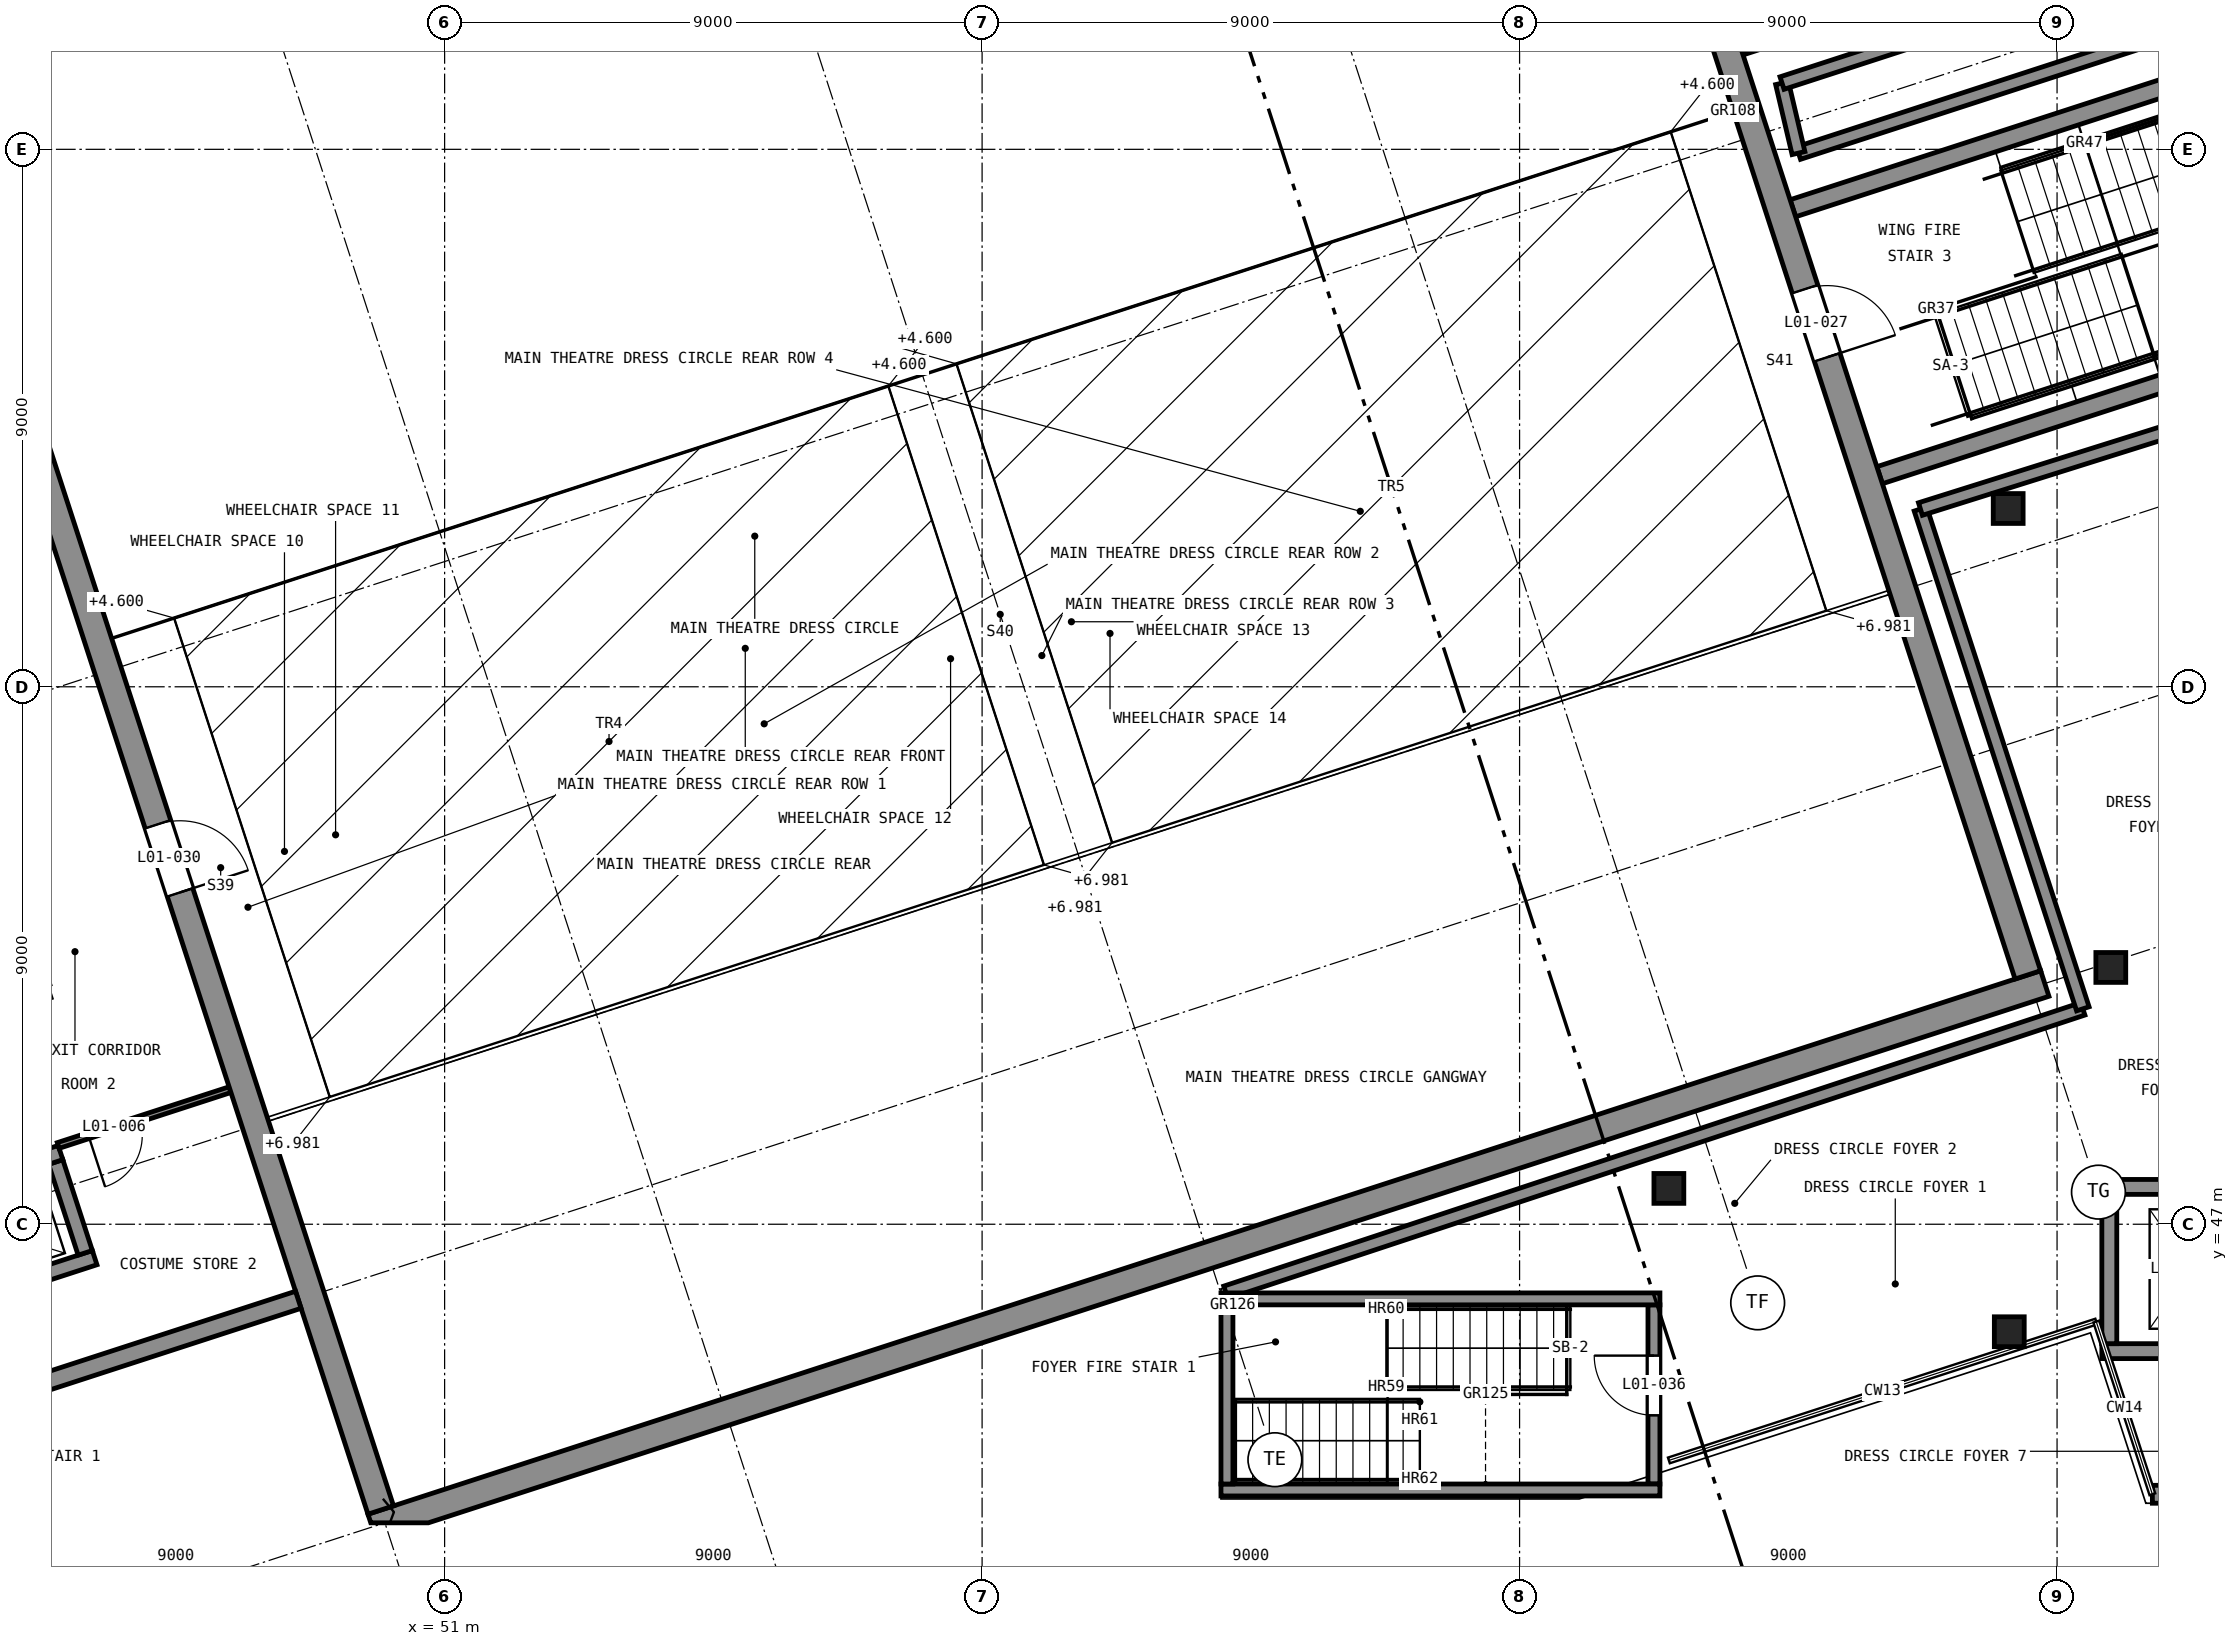
"""IFC4 building model, lengths in metres.
Left out: names, types, materials, properties, quantities, classifications, styles, units other than length and angle.
Written with IfcOpenShell. Run it as: python <this file> out.ifc"""

import sys

from ifc_helpers import new_model, si_unit, direction, frame, frame_2d, origin, origin_2d, place, context, subcontext, project, spatial, rectangle, extrude, element, fill, save


model = new_model("IFC4")
c1 = context("Model", 3, precision=1e-05, world=origin(), true_north=direction((0.0, 1.0)))
c2 = subcontext(c1, "Body", "Model", "MODEL_VIEW")
j1 = project(units=[si_unit("LENGTHUNIT", "METRE"), si_unit("PLANEANGLEUNIT", "RADIAN")], contexts=[c1])
p1 = place(None, origin())
s1 = spatial("IfcSite", under=j1, at=p1, CompositionType="ELEMENT")
p2 = place(p1, origin())
s2 = spatial("IfcBuilding", under=s1, at=p2, CompositionType="ELEMENT")
p3 = place(p2, frame((0.0, 0.0, 5.5)))
s3 = spatial("IfcBuildingStorey", under=s2, at=p3, CompositionType="ELEMENT", Elevation=5.5)
p4 = place(p3, frame((49.786, 41.93, 0.0), z_axis=(0.0, 0.0, 1.0), x_axis=(0.951055937194, 0.309018776661, 0.0)))
e1 = element("IfcWall", 1, at=p4, inside=s3, PredefinedType="SHEAR", context=c2, shape_type="SweptSolid", body=[
    extrude(rectangle(XDim=29.45, YDim=0.45, at=frame_2d((14.725, 0.0))), origin(), (0.0, 0.0, 1.0), 4.0),
])
p5 = place(p3, frame((49.93, 42.214, 0.0), z_axis=(0.0, 0.0, 1.0), x_axis=(-0.309016215614, 0.95105676933, 0.0)))
e2 = element("IfcWall", 2, at=p5, inside=s3, PredefinedType="SHEAR", context=c2, shape_type="SweptSolid", body=[
    extrude(rectangle(XDim=27.975, YDim=0.45, at=frame_2d((13.988, 0.0))), origin(), (0.0, 0.0, 1.0), 4.0),
])
p6 = place(p5, frame((10.875, 0.0, 0.0)))
e3 = element("IfcOpeningElement", 3, at=p6, cuts=e2, PredefinedType="OPENING", context=c2, shape_type="SweptSolid", body=[
    extrude(rectangle(XDim=1.2, YDim=2.1, at=frame_2d((0.6, 1.05))), frame((0.0, 0.235, 0.0), z_axis=(0.0, -1.0, 0.0), x_axis=(1.0, 0.0, 0.0)), (0.0, 0.0, 1.0), 0.47),
])
p7 = place(p3, frame((77.511, 51.176, 0.0), z_axis=(0.0, 0.0, 1.0), x_axis=(-0.309018780445, 0.951055935964, 0.0)))
e4 = element("IfcWall", 4, at=p7, inside=s3, PredefinedType="SHEAR", context=c2, shape_type="SweptSolid", body=[
    extrude(rectangle(XDim=27.975, YDim=0.45, at=frame_2d((13.987, 0.0))), origin(), (0.0, 0.0, 1.0), 4.0),
])
p8 = place(p7, frame((10.875, 0.0, 0.0)))
e5 = element("IfcOpeningElement", 5, at=p8, cuts=e4, PredefinedType="OPENING", context=c2, shape_type="SweptSolid", body=[
    extrude(rectangle(XDim=1.2, YDim=2.1, at=frame_2d((0.6, 1.05))), frame((0.0, 0.235, 0.0), z_axis=(0.0, -1.0, 0.0), x_axis=(1.0, 0.0, 0.0)), (0.0, 0.0, 1.0), 0.47),
])
p9 = place(p3, frame((48.55, 45.735, 0.0), z_axis=(0.0, 0.0, 1.0), x_axis=(-0.951061216338, -0.309002528757, 0.0)))
e6 = element("IfcWall", 6, at=p9, inside=s3, PredefinedType="SOLIDWALL", context=c2, shape_type="SweptSolid", body=[
    extrude(rectangle(XDim=15.925, YDim=0.3, at=frame_2d((7.962, 0.0))), origin(), (0.0, 0.0, 1.0), 4.0),
])
p10 = place(p3, frame((75.029, 59.543, 0.0), z_axis=(0.0, 0.0, 1.0), x_axis=(0.951057649576, 0.309013506475, 0.0)))
e7 = element("IfcWall", 7, at=p10, inside=s3, PredefinedType="SOLIDWALL", context=c2, shape_type="SweptSolid", body=[
    extrude(rectangle(XDim=7.075, YDim=0.3, at=frame_2d((3.538, 0.0))), origin(), (0.0, 0.0, 1.0), 3.7),
])
p11 = place(p3, frame((80.305, 66.199, 0.0), z_axis=(0.0, 0.0, 1.0), x_axis=(-0.951054354327, -0.309023648149, 0.0)))
e8 = element("IfcWall", 8, at=p11, inside=s3, PredefinedType="SOLIDWALL", context=c2, shape_type="SweptSolid", body=[
    extrude(rectangle(XDim=7.075, YDim=0.3, at=frame_2d((3.537, 0.0))), origin(), (0.0, 0.0, 1.0), 3.7),
])
p12 = place(p3, frame((42.382, 45.544, 0.0), z_axis=(0.0, 0.0, 1.0), x_axis=(0.951071801089, 0.308969948659, 0.0)))
e9 = element("IfcWall", 9, at=p12, inside=s3, PredefinedType="SHEAR", context=c2, shape_type="SweptSolid", body=[
    extrude(rectangle(XDim=2.9, YDim=0.25, at=frame_2d((1.45, 0.0))), origin(), (0.0, 0.0, 1.0), 4.0),
])
p13 = place(p3, frame((44.982, 46.521, 0.0), z_axis=(0.0, 0.0, 1.0), x_axis=(-0.308986014439, 0.951066581729, 0.0)))
e10 = element("IfcWall", 10, at=p13, inside=s3, PredefinedType="SHEAR", context=c2, shape_type="SweptSolid", body=[
    extrude(rectangle(XDim=1.6, YDim=0.25, at=frame_2d((0.8, 0.0))), origin(), (0.0, 0.0, 1.0), 4.0),
])
p14 = place(p3, frame((44.568, 48.2, 0.0), z_axis=(0.0, 0.0, 1.0), x_axis=(-0.951047059821, -0.309046096893, 0.0)))
e11 = element("IfcWall", 11, at=p14, inside=s3, PredefinedType="SHEAR", context=c2, shape_type="SweptSolid", body=[
    extrude(rectangle(XDim=2.9, YDim=0.25, at=frame_2d((1.45, 0.0))), origin(), (0.0, 0.0, 1.0), 4.0),
])
p15 = place(p14, frame((0.9, 0.0, 0.0)))
e12 = element("IfcOpeningElement", 12, at=p15, cuts=e11, PredefinedType="OPENING", context=c2, shape_type="SweptSolid", body=[
    extrude(rectangle(XDim=1.1, YDim=2.1, at=frame_2d((0.55, 1.05))), frame((0.0, 0.135, 0.0), z_axis=(0.0, -1.0, 0.0), x_axis=(1.0, 0.0, 0.0)), (0.0, 0.0, 1.0), 0.27),
])
p16 = place(p3, frame((72.727, 66.708, 0.0), z_axis=(0.0, 0.0, 1.0), x_axis=(0.951087187149, 0.308922583248, 0.0)))
e13 = element("IfcWall", 13, at=p16, inside=s3, PredefinedType="SHEAR", context=c2, shape_type="SweptSolid", body=[
    extrude(rectangle(XDim=2.6, YDim=0.25, at=frame_2d((1.3, 0.0))), origin(), (0.0, 0.0, 1.0), 4.0),
])
for number, where, z_axis, x_axis in (
    (14, (64.0, 42.55, 0.0), (0.0, 0.0, 1.0), (1.0, 0.0, 0.0)),
    (15, (71.35, 45.75, 0.0), (0.0, 0.0, 1.0), (-1.0, 0.0, 0.0)),
):
    element("IfcWall", number, at=place(p3, frame(where, z_axis=z_axis, x_axis=x_axis)), inside=s3, PredefinedType="SHEAR", context=c2, shape_type="SweptSolid", body=[
        extrude(rectangle(XDim=7.35, YDim=0.2, at=frame_2d((3.675, 0.0))), origin(), (0.0, 0.0, 1.0), 4.0),
    ])
p17 = place(p3, frame((64.1, 45.65, 0.0), z_axis=(0.0, 0.0, 1.0), x_axis=(0.0, -1.0, 0.0)))
e16 = element("IfcWall", 16, at=p17, inside=s3, PredefinedType="SHEAR", context=c2, shape_type="SweptSolid", body=[
    extrude(rectangle(XDim=3.0, YDim=0.2, at=frame_2d((1.5, 0.0))), origin(), (0.0, 0.0, 1.0), 4.0),
])
p18 = place(p3, frame((71.25, 42.65, 0.0), z_axis=(0.0, 0.0, 1.0), x_axis=(0.0, 1.0, 0.0)))
e17 = element("IfcWall", 17, at=p18, inside=s3, PredefinedType="SHEAR", context=c2, shape_type="SweptSolid", body=[
    extrude(rectangle(XDim=3.0, YDim=0.2, at=frame_2d((1.5, 0.0))), origin(), (0.0, 0.0, 1.0), 4.0),
])
p19 = place(p18, frame((1.15, 0.0, 0.0)))
e18 = element("IfcOpeningElement", 18, at=p19, cuts=e17, PredefinedType="OPENING", context=c2, shape_type="SweptSolid", body=[
    extrude(rectangle(XDim=1.0, YDim=2.1, at=frame_2d((0.5, 1.05))), frame((0.0, 0.11, 0.0), z_axis=(0.0, -1.0, 0.0), x_axis=(1.0, 0.0, 0.0)), (0.0, 0.0, 1.0), 0.22),
])
for number, where, z_axis, x_axis in (
    (19, (78.75, 44.875, 0.0), (0.0, 0.0, 1.0), (1.0, 0.0, 0.0)),
    (20, (81.75, 47.625, 0.0), (0.0, 0.0, 1.0), (-1.0, 0.0, 0.0)),
):
    element("IfcWall", number, at=place(p3, frame(where, z_axis=z_axis, x_axis=x_axis)), inside=s3, PredefinedType="SHEAR", context=c2, shape_type="SweptSolid", body=[
        extrude(rectangle(XDim=3.0, YDim=0.25, at=frame_2d((1.5, 0.0))), origin(), (0.0, 0.0, 1.0), 4.0),
    ])
p20 = place(p3, frame((78.875, 47.5, 0.0), z_axis=(0.0, 0.0, 1.0), x_axis=(0.0, -1.0, 0.0)))
e21 = element("IfcWall", 21, at=p20, inside=s3, PredefinedType="SHEAR", context=c2, shape_type="SweptSolid", body=[
    extrude(rectangle(XDim=2.5, YDim=0.25, at=frame_2d((1.25, 0.0))), origin(), (0.0, 0.0, 1.0), 4.0),
])
for number, where, z_axis, x_axis in (
    (22, (77.2, 45.2, 0.0), (0.0, 0.0, 1.0), (1.0, 0.0, 0.0)),
    (23, (71.5, 47.6, 0.0), (0.0, 0.0, 1.0), (1.0, 0.0, 0.0)),
    (24, (78.9, 51.3, 0.0), (0.0, 0.0, 1.0), (1.0, 0.0, 0.0)),
    (25, (77.182, 58.985, 0.0), (0.0, 0.0, 1.0), (1.0, 0.0, 0.0)),
):
    element("IfcColumn", number, at=place(p3, frame(where, z_axis=z_axis, x_axis=x_axis)), inside=s3, PredefinedType="COLUMN", context=c2, shape_type="SweptSolid", body=[
        extrude(rectangle(XDim=0.5, YDim=0.5, at=origin_2d()), origin(), (0.0, 0.0, 1.0), 4.0),
    ])
p21 = place(p3, frame((79.596, 42.478, 0.0), z_axis=(0.0, 0.0, 1.0), x_axis=(1.0, 0.0, 0.0)))
e26 = element("IfcWall", 26, at=p21, inside=s3, PredefinedType="SOLIDWALL", context=c2, shape_type="SweptSolid", body=[
    extrude(rectangle(XDim=2.941, YDim=0.3, at=frame_2d((1.471, 0.0))), origin(), (0.0, 0.0, 1.0), 3.7),
])
p22 = place(p3, frame((64.081, 45.859, 0.0), z_axis=(0.0, 0.0, 1.0), x_axis=(0.949388338269, 0.314104732786, 0.0)))
e27 = element("IfcWall", 27, at=p22, inside=s3, PredefinedType="SOLIDWALL", context=c2, shape_type="SweptSolid", body=[
    extrude(rectangle(XDim=15.116, YDim=0.22, at=frame_2d((7.558, 0.0))), origin(), (0.0, 0.0, 1.0), 3.7),
])
p23 = place(p3, frame((78.432, 50.607, 0.0), z_axis=(0.0, 0.0, 1.0), x_axis=(-0.309027731765, 0.951053027439, 0.0)))
e28 = element("IfcWall", 28, at=p23, inside=s3, PredefinedType="SOLIDWALL", context=c2, shape_type="SweptSolid", body=[
    extrude(rectangle(XDim=8.8, YDim=0.22, at=frame_2d((4.4, 0.0))), origin(), (0.0, 0.0, 1.0), 3.7),
])
p24 = place(p3, frame((75.712, 58.977, 0.0), z_axis=(0.0, 0.0, 1.0), x_axis=(0.954020604523, 0.299741031802, 0.0)))
e29 = element("IfcWall", 29, at=p24, inside=s3, PredefinedType="SOLIDWALL", context=c2, shape_type="SweptSolid", body=[
    extrude(rectangle(XDim=7.271, YDim=0.22, at=frame_2d((3.635, 0.0))), origin(), (0.0, 0.0, 1.0), 3.7),
])
p25 = place(p3, frame((80.613, 67.193, 0.0), z_axis=(0.0, 0.0, 1.0), x_axis=(-0.951057168147, -0.309014988174, 0.0)))
e30 = element("IfcWall", 30, at=p25, inside=s3, PredefinedType="SOLIDWALL", context=c2, shape_type="SweptSolid", body=[
    extrude(rectangle(XDim=7.3, YDim=0.22, at=frame_2d((3.65, 0.0))), origin(), (0.0, 0.0, 1.0), 3.7),
])
p26 = place(p3, frame((73.67, 64.937, 0.0), z_axis=(0.0, 0.0, 1.0), x_axis=(-0.228915017266, 0.973446410888, 0.0)))
e31 = element("IfcWall", 31, at=p26, inside=s3, PredefinedType="SOLIDWALL", context=c2, shape_type="SweptSolid", body=[
    extrude(rectangle(XDim=1.204, YDim=0.22, at=frame_2d((0.602, 0.0))), origin(), (0.0, 0.0, 1.0), 3.7),
])
p27 = place(p3, frame((73.395, 66.109, 0.0), z_axis=(0.0, 0.0, 1.0), x_axis=(0.951047059821, 0.309046096893, 0.0)))
e32 = element("IfcWall", 32, at=p27, inside=s3, PredefinedType="SOLIDWALL", context=c2, shape_type="SweptSolid", body=[
    extrude(rectangle(XDim=2.9, YDim=0.22, at=frame_2d((1.45, 0.0))), origin(), (0.0, 0.0, 1.0), 3.7),
])
p28 = place(p3, frame((44.53, 48.319, 0.0), z_axis=(0.0, 0.0, 1.0), x_axis=(0.951053046121, 0.30902767427, 0.0)))
e33 = element("IfcWall", 33, at=p28, inside=s3, PredefinedType="PARTITIONING", context=c2, shape_type="SweptSolid", body=[
    extrude(rectangle(XDim=3.025, YDim=0.1, at=frame_2d((1.512, 0.0))), origin(), (0.0, 0.0, 1.0), 3.7),
])
p29 = place(p28, frame((0.533, 0.0, 0.0)))
e34 = element("IfcOpeningElement", 34, at=p29, cuts=e33, PredefinedType="OPENING", context=c2, shape_type="SweptSolid", body=[
    extrude(rectangle(XDim=0.9, YDim=2.1, at=frame_2d((0.45, 1.05))), frame((0.0, 0.06, 0.0), z_axis=(0.0, -1.0, 0.0), x_axis=(1.0, 0.0, 0.0)), (0.0, 0.0, 1.0), 0.12),
])
p30 = place(p29, frame((0.9, 0.0, 0.0), z_axis=(0.0, 0.0, 1.0), x_axis=(-1.0, 0.0, 0.0)))
e35 = element("IfcDoor", 35, at=p30, inside=s3, OperationType="SINGLE_SWING_LEFT", PredefinedType="DOOR", context=c2, shape_type="SweptSolid", body=[
    extrude(rectangle(XDim=0.9, YDim=2.1, at=frame_2d((0.45, 1.05))), frame((0.0, 0.025, 0.0), z_axis=(0.0, -1.0, 0.0), x_axis=(1.0, 0.0, 0.0)), (0.0, 0.0, 1.0), 0.05),
])
fill(e34, e35)
p31 = place(p8, frame((1.2, 0.0, 0.0), z_axis=(0.0, 0.0, 1.0), x_axis=(-1.0, 0.0, 0.0)))
e36 = element("IfcDoor", 36, at=p31, inside=s3, OperationType="SINGLE_SWING_LEFT", PredefinedType="DOOR", context=c2, shape_type="SweptSolid", body=[
    extrude(rectangle(XDim=1.2, YDim=2.1, at=frame_2d((0.6, 1.05))), frame((0.0, 0.025, 0.0), z_axis=(0.0, -1.0, 0.0), x_axis=(1.0, 0.0, 0.0)), (0.0, 0.0, 1.0), 0.05),
])
fill(e5, e36)
p32 = place(p6, frame((1.2, 0.0, 0.0), z_axis=(0.0, 0.0, 1.0), x_axis=(-1.0, 0.0, 0.0)))
e37 = element("IfcDoor", 37, at=p32, inside=s3, OperationType="SINGLE_SWING_LEFT", PredefinedType="DOOR", context=c2, shape_type="SweptSolid", body=[
    extrude(rectangle(XDim=1.2, YDim=2.1, at=frame_2d((0.6, 1.05))), frame((0.0, 0.025, 0.0), z_axis=(0.0, -1.0, 0.0), x_axis=(1.0, 0.0, 0.0)), (0.0, 0.0, 1.0), 0.05),
])
fill(e3, e37)
p33 = place(p19, origin())
e38 = element("IfcDoor", 38, at=p33, inside=s3, OperationType="SINGLE_SWING_LEFT", PredefinedType="DOOR", context=c2, shape_type="SweptSolid", body=[
    extrude(rectangle(XDim=1.0, YDim=2.1, at=frame_2d((0.5, 1.05))), frame((0.0, 0.025, 0.0), z_axis=(0.0, -1.0, 0.0), x_axis=(1.0, 0.0, 0.0)), (0.0, 0.0, 1.0), 0.05),
])
fill(e18, e38)
save(model, sys.argv[1])
